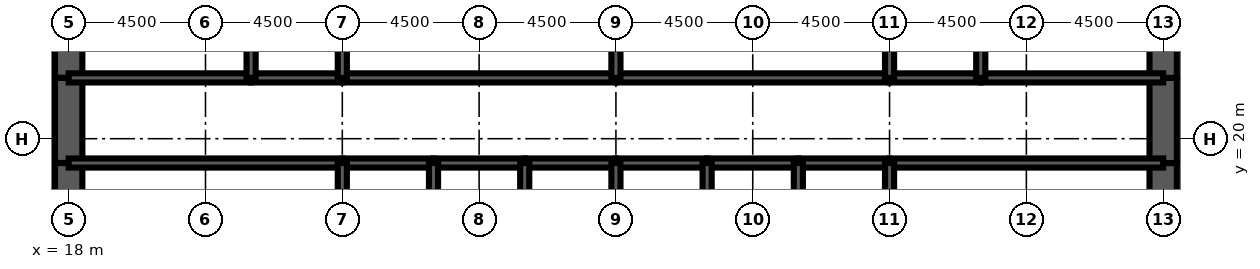
"""IFC4 building model, lengths in metres.
Left out: names, types, materials, properties, quantities, classifications, styles, units other than length and angle.
Written with IfcOpenShell. Run it as: python <this file> out.ifc"""

import sys

from ifc_helpers import new_model, si_unit, direction, frame, frame_2d, origin, place, context, subcontext, project, spatial, rectangle, extrude, element, fill, save


model = new_model("IFC4")
c1 = context("Model", 3, precision=1e-05, world=origin(), true_north=direction((0.0, 1.0)))
c2 = subcontext(c1, "Body", "Model", "MODEL_VIEW")
j1 = project(units=[si_unit("LENGTHUNIT", "METRE"), si_unit("PLANEANGLEUNIT", "RADIAN")], contexts=[c1])
p1 = place(None, origin())
s1 = spatial("IfcSite", under=j1, at=p1, CompositionType="ELEMENT")
p2 = place(p1, origin())
s2 = spatial("IfcBuilding", under=s1, at=p2, CompositionType="ELEMENT")
p3 = place(p2, frame((0.0, 0.0, 63.5)))
s3 = spatial("IfcBuildingStorey", under=s2, at=p3, CompositionType="ELEMENT", Elevation=63.5)
p4 = place(p3, frame((18.0, 26.0, 0.0), z_axis=(0.0, 0.0, 1.0), x_axis=(0.0, -1.0, 0.0)))
e1 = element("IfcWall", 1, at=p4, inside=s3, PredefinedType="SHEAR", context=c2, shape_type="SweptSolid", body=[
    extrude(rectangle(XDim=4.0, YDim=0.9, at=frame_2d((2.0, 0.0))), origin(), (0.0, 0.0, 1.0), 4.5),
])
p5 = place(p3, frame((18.0, 22.0, 0.0), z_axis=(0.0, 0.0, 1.0), x_axis=(0.0, -1.0, 0.0)))
e2 = element("IfcWall", 2, at=p5, inside=s3, PredefinedType="SHEAR", context=c2, shape_type="SweptSolid", body=[
    extrude(rectangle(XDim=2.8, YDim=0.9, at=frame_2d((1.4, 0.0))), origin(), (0.0, 0.0, 1.0), 4.5),
])
p6 = place(p5, frame((0.6, 0.0, 0.0)))
e3 = element("IfcOpeningElement", 3, at=p6, cuts=e2, PredefinedType="OPENING", context=c2, shape_type="SweptSolid", body=[
    extrude(rectangle(XDim=1.8, YDim=2.1, at=frame_2d((0.9, 1.05))), frame((0.0, 0.46, 0.0), z_axis=(0.0, -1.0, 0.0), x_axis=(1.0, 0.0, 0.0)), (0.0, 0.0, 1.0), 0.92),
])
for number, where, z_axis, x_axis in (
    (4, (18.0, 19.2, 0.0), (0.0, 0.0, 1.0), (0.0, -1.0, 0.0)),
    (5, (54.0, 16.0, 0.0), (0.0, 0.0, 1.0), (0.0, 1.0, 0.0)),
):
    element("IfcWall", number, at=place(p3, frame(where, z_axis=z_axis, x_axis=x_axis)), inside=s3, PredefinedType="SHEAR", context=c2, shape_type="SweptSolid", body=[
        extrude(rectangle(XDim=3.2, YDim=0.9, at=frame_2d((1.6, 0.0))), origin(), (0.0, 0.0, 1.0), 4.5),
    ])
p7 = place(p3, frame((54.0, 19.2, 0.0), z_axis=(0.0, 0.0, 1.0), x_axis=(0.0, 1.0, 0.0)))
e6 = element("IfcWall", 6, at=p7, inside=s3, PredefinedType="SHEAR", context=c2, shape_type="SweptSolid", body=[
    extrude(rectangle(XDim=2.8, YDim=0.9, at=frame_2d((1.4, 0.0))), origin(), (0.0, 0.0, 1.0), 4.5),
])
p8 = place(p7, frame((0.4, 0.0, 0.0)))
e7 = element("IfcOpeningElement", 7, at=p8, cuts=e6, PredefinedType="OPENING", context=c2, shape_type="SweptSolid", body=[
    extrude(rectangle(XDim=1.8, YDim=2.1, at=frame_2d((0.9, 1.05))), frame((0.0, 0.46, 0.0), z_axis=(0.0, -1.0, 0.0), x_axis=(1.0, 0.0, 0.0)), (0.0, 0.0, 1.0), 0.92),
])
p9 = place(p3, frame((54.0, 22.0, 0.0), z_axis=(0.0, 0.0, 1.0), x_axis=(0.0, 1.0, 0.0)))
e8 = element("IfcWall", 8, at=p9, inside=s3, PredefinedType="SHEAR", context=c2, shape_type="SweptSolid", body=[
    extrude(rectangle(XDim=4.0, YDim=0.9, at=frame_2d((2.0, 0.0))), origin(), (0.0, 0.0, 1.0), 4.5),
])
p10 = place(p3, frame((18.0, 19.2, 0.0), z_axis=(0.0, 0.0, 1.0), x_axis=(1.0, 0.0, 0.0)))
e9 = element("IfcWall", 9, at=p10, inside=s3, PredefinedType="SOLIDWALL", context=c2, shape_type="SweptSolid", body=[
    extrude(rectangle(XDim=9.0, YDim=0.3, at=frame_2d((4.5, 0.0))), origin(), (0.0, 0.0, 1.0), 4.5),
])
p11 = place(p10, frame((0.65, 0.0, 0.0)))
e10 = element("IfcOpeningElement", 10, at=p11, cuts=e9, PredefinedType="OPENING", context=c2, shape_type="SweptSolid", body=[
    extrude(rectangle(XDim=1.0, YDim=2.1, at=frame_2d((0.5, 1.05))), frame((0.0, 0.16, 0.0), z_axis=(0.0, -1.0, 0.0), x_axis=(1.0, 0.0, 0.0)), (0.0, 0.0, 1.0), 0.32),
])
p12 = place(p3, frame((27.0, 19.2, 0.0), z_axis=(0.0, 0.0, 1.0), x_axis=(1.0, 0.0, 0.0)))
e11 = element("IfcWall", 11, at=p12, inside=s3, PredefinedType="SOLIDWALL", context=c2, shape_type="SweptSolid", body=[
    extrude(rectangle(XDim=3.0, YDim=0.3, at=frame_2d((1.5, 0.0))), origin(), (0.0, 0.0, 1.0), 4.5),
])
p13 = place(p12, frame((0.95, 0.0, 0.0)))
e12 = element("IfcOpeningElement", 12, at=p13, cuts=e11, PredefinedType="OPENING", context=c2, shape_type="SweptSolid", body=[
    extrude(rectangle(XDim=1.1, YDim=2.2, at=frame_2d((0.55, 1.1))), frame((0.0, 0.16, 0.0), z_axis=(0.0, -1.0, 0.0), x_axis=(1.0, 0.0, 0.0)), (0.0, 0.0, 1.0), 0.32),
])
p14 = place(p3, frame((30.0, 19.2, 0.0), z_axis=(0.0, 0.0, 1.0), x_axis=(1.0, 0.0, 0.0)))
e13 = element("IfcWall", 13, at=p14, inside=s3, PredefinedType="SOLIDWALL", context=c2, shape_type="SweptSolid", body=[
    extrude(rectangle(XDim=3.0, YDim=0.3, at=frame_2d((1.5, 0.0))), origin(), (0.0, 0.0, 1.0), 4.5),
])
p15 = place(p14, frame((0.95, 0.0, 0.0)))
e14 = element("IfcOpeningElement", 14, at=p15, cuts=e13, PredefinedType="OPENING", context=c2, shape_type="SweptSolid", body=[
    extrude(rectangle(XDim=1.1, YDim=2.2, at=frame_2d((0.55, 1.1))), frame((0.0, 0.16, 0.0), z_axis=(0.0, -1.0, 0.0), x_axis=(1.0, 0.0, 0.0)), (0.0, 0.0, 1.0), 0.32),
])
p16 = place(p3, frame((33.0, 19.2, 0.0), z_axis=(0.0, 0.0, 1.0), x_axis=(1.0, 0.0, 0.0)))
e15 = element("IfcWall", 15, at=p16, inside=s3, PredefinedType="SOLIDWALL", context=c2, shape_type="SweptSolid", body=[
    extrude(rectangle(XDim=3.0, YDim=0.3, at=frame_2d((1.5, 0.0))), origin(), (0.0, 0.0, 1.0), 4.5),
])
p17 = place(p16, frame((0.95, 0.0, 0.0)))
e16 = element("IfcOpeningElement", 16, at=p17, cuts=e15, PredefinedType="OPENING", context=c2, shape_type="SweptSolid", body=[
    extrude(rectangle(XDim=1.1, YDim=2.2, at=frame_2d((0.55, 1.1))), frame((0.0, 0.16, 0.0), z_axis=(0.0, -1.0, 0.0), x_axis=(1.0, 0.0, 0.0)), (0.0, 0.0, 1.0), 0.32),
])
p18 = place(p3, frame((36.0, 19.2, 0.0), z_axis=(0.0, 0.0, 1.0), x_axis=(1.0, 0.0, 0.0)))
e17 = element("IfcWall", 17, at=p18, inside=s3, PredefinedType="SOLIDWALL", context=c2, shape_type="SweptSolid", body=[
    extrude(rectangle(XDim=3.0, YDim=0.3, at=frame_2d((1.5, 0.0))), origin(), (0.0, 0.0, 1.0), 4.5),
])
p19 = place(p18, frame((0.95, 0.0, 0.0)))
e18 = element("IfcOpeningElement", 18, at=p19, cuts=e17, PredefinedType="OPENING", context=c2, shape_type="SweptSolid", body=[
    extrude(rectangle(XDim=1.1, YDim=2.2, at=frame_2d((0.55, 1.1))), frame((0.0, 0.16, 0.0), z_axis=(0.0, -1.0, 0.0), x_axis=(1.0, 0.0, 0.0)), (0.0, 0.0, 1.0), 0.32),
])
for number, where, z_axis, x_axis in (
    (19, (39.0, 19.2, 0.0), (0.0, 0.0, 1.0), (1.0, 0.0, 0.0)),
    (20, (42.0, 19.2, 0.0), (0.0, 0.0, 1.0), (1.0, 0.0, 0.0)),
):
    element("IfcWall", number, at=place(p3, frame(where, z_axis=z_axis, x_axis=x_axis)), inside=s3, PredefinedType="SOLIDWALL", context=c2, shape_type="SweptSolid", body=[
        extrude(rectangle(XDim=3.0, YDim=0.3, at=frame_2d((1.5, 0.0))), origin(), (0.0, 0.0, 1.0), 4.5),
    ])
p20 = place(p3, frame((45.0, 19.2, 0.0), z_axis=(0.0, 0.0, 1.0), x_axis=(1.0, 0.0, 0.0)))
e21 = element("IfcWall", 21, at=p20, inside=s3, PredefinedType="SOLIDWALL", context=c2, shape_type="SweptSolid", body=[
    extrude(rectangle(XDim=9.0, YDim=0.3, at=frame_2d((4.5, 0.0))), origin(), (0.0, 0.0, 1.0), 4.5),
])
p21 = place(p20, frame((7.35, 0.0, 0.0)))
e22 = element("IfcOpeningElement", 22, at=p21, cuts=e21, PredefinedType="OPENING", context=c2, shape_type="SweptSolid", body=[
    extrude(rectangle(XDim=1.0, YDim=2.1, at=frame_2d((0.5, 1.05))), frame((0.0, 0.16, 0.0), z_axis=(0.0, -1.0, 0.0), x_axis=(1.0, 0.0, 0.0)), (0.0, 0.0, 1.0), 0.32),
])
p22 = place(p3, frame((18.0, 22.0, 0.0), z_axis=(0.0, 0.0, 1.0), x_axis=(1.0, 0.0, 0.0)))
e23 = element("IfcWall", 23, at=p22, inside=s3, PredefinedType="SOLIDWALL", context=c2, shape_type="SweptSolid", body=[
    extrude(rectangle(XDim=6.0, YDim=0.3, at=frame_2d((3.0, 0.0))), origin(), (0.0, 0.0, 1.0), 4.5),
])
p23 = place(p22, frame((2.0, 0.0, 0.0)))
e24 = element("IfcOpeningElement", 24, at=p23, cuts=e23, PredefinedType="OPENING", context=c2, shape_type="SweptSolid", body=[
    extrude(rectangle(XDim=1.0, YDim=2.1, at=frame_2d((0.5, 1.05))), frame((0.0, 0.16, 0.0), z_axis=(0.0, -1.0, 0.0), x_axis=(1.0, 0.0, 0.0)), (0.0, 0.0, 1.0), 0.32),
])
p24 = place(p3, frame((24.0, 22.0, 0.0), z_axis=(0.0, 0.0, 1.0), x_axis=(1.0, 0.0, 0.0)))
e25 = element("IfcWall", 25, at=p24, inside=s3, PredefinedType="SOLIDWALL", context=c2, shape_type="SweptSolid", body=[
    extrude(rectangle(XDim=3.0, YDim=0.3, at=frame_2d((1.5, 0.0))), origin(), (0.0, 0.0, 1.0), 4.5),
])
p25 = place(p24, frame((1.0, 0.0, 0.0)))
e26 = element("IfcOpeningElement", 26, at=p25, cuts=e25, PredefinedType="OPENING", context=c2, shape_type="SweptSolid", body=[
    extrude(rectangle(XDim=1.0, YDim=2.1, at=frame_2d((0.5, 1.05))), frame((0.0, 0.16, 0.0), z_axis=(0.0, -1.0, 0.0), x_axis=(1.0, 0.0, 0.0)), (0.0, 0.0, 1.0), 0.32),
])
p26 = place(p3, frame((27.0, 22.0, 0.0), z_axis=(0.0, 0.0, 1.0), x_axis=(1.0, 0.0, 0.0)))
e27 = element("IfcWall", 27, at=p26, inside=s3, PredefinedType="SOLIDWALL", context=c2, shape_type="SweptSolid", body=[
    extrude(rectangle(XDim=9.0, YDim=0.3, at=frame_2d((4.5, 0.0))), origin(), (0.0, 0.0, 1.0), 4.5),
])
p27 = place(p26, frame((4.0, 0.0, 0.0)))
e28 = element("IfcOpeningElement", 28, at=p27, cuts=e27, PredefinedType="OPENING", context=c2, shape_type="SweptSolid", body=[
    extrude(rectangle(XDim=1.0, YDim=2.1, at=frame_2d((0.5, 1.05))), frame((0.0, 0.16, 0.0), z_axis=(0.0, -1.0, 0.0), x_axis=(1.0, 0.0, 0.0)), (0.0, 0.0, 1.0), 0.32),
])
p28 = place(p3, frame((36.0, 22.0, 0.0), z_axis=(0.0, 0.0, 1.0), x_axis=(1.0, 0.0, 0.0)))
e29 = element("IfcWall", 29, at=p28, inside=s3, PredefinedType="SOLIDWALL", context=c2, shape_type="SweptSolid", body=[
    extrude(rectangle(XDim=9.0, YDim=0.3, at=frame_2d((4.5, 0.0))), origin(), (0.0, 0.0, 1.0), 4.5),
])
p29 = place(p28, frame((4.0, 0.0, 0.0)))
e30 = element("IfcOpeningElement", 30, at=p29, cuts=e29, PredefinedType="OPENING", context=c2, shape_type="SweptSolid", body=[
    extrude(rectangle(XDim=1.0, YDim=2.1, at=frame_2d((0.5, 1.05))), frame((0.0, 0.16, 0.0), z_axis=(0.0, -1.0, 0.0), x_axis=(1.0, 0.0, 0.0)), (0.0, 0.0, 1.0), 0.32),
])
p30 = place(p3, frame((45.0, 22.0, 0.0), z_axis=(0.0, 0.0, 1.0), x_axis=(1.0, 0.0, 0.0)))
e31 = element("IfcWall", 31, at=p30, inside=s3, PredefinedType="SOLIDWALL", context=c2, shape_type="SweptSolid", body=[
    extrude(rectangle(XDim=3.0, YDim=0.3, at=frame_2d((1.5, 0.0))), origin(), (0.0, 0.0, 1.0), 4.5),
])
p31 = place(p30, frame((1.0, 0.0, 0.0)))
e32 = element("IfcOpeningElement", 32, at=p31, cuts=e31, PredefinedType="OPENING", context=c2, shape_type="SweptSolid", body=[
    extrude(rectangle(XDim=1.0, YDim=2.1, at=frame_2d((0.5, 1.05))), frame((0.0, 0.16, 0.0), z_axis=(0.0, -1.0, 0.0), x_axis=(1.0, 0.0, 0.0)), (0.0, 0.0, 1.0), 0.32),
])
p32 = place(p3, frame((48.0, 22.0, 0.0), z_axis=(0.0, 0.0, 1.0), x_axis=(1.0, 0.0, 0.0)))
e33 = element("IfcWall", 33, at=p32, inside=s3, PredefinedType="SOLIDWALL", context=c2, shape_type="SweptSolid", body=[
    extrude(rectangle(XDim=6.0, YDim=0.3, at=frame_2d((3.0, 0.0))), origin(), (0.0, 0.0, 1.0), 4.5),
])
p33 = place(p32, frame((2.0, 0.0, 0.0)))
e34 = element("IfcOpeningElement", 34, at=p33, cuts=e33, PredefinedType="OPENING", context=c2, shape_type="SweptSolid", body=[
    extrude(rectangle(XDim=1.0, YDim=2.1, at=frame_2d((0.5, 1.05))), frame((0.0, 0.16, 0.0), z_axis=(0.0, -1.0, 0.0), x_axis=(1.0, 0.0, 0.0)), (0.0, 0.0, 1.0), 0.32),
])
p34 = place(p32, frame((4.0, 0.0, 0.0)))
e35 = element("IfcOpeningElement", 35, at=p34, cuts=e33, PredefinedType="OPENING", context=c2, shape_type="SweptSolid", body=[
    extrude(rectangle(XDim=1.0, YDim=2.1, at=frame_2d((0.5, 1.05))), frame((0.0, 0.16, 0.0), z_axis=(0.0, -1.0, 0.0), x_axis=(1.0, 0.0, 0.0)), (0.0, 0.0, 1.0), 0.32),
])
for number, where, z_axis, x_axis in (
    (36, (27.0, 16.0, 0.0), (0.0, 0.0, 1.0), (0.0, 1.0, 0.0)),
    (37, (30.0, 16.0, 0.0), (0.0, 0.0, 1.0), (0.0, 1.0, 0.0)),
    (38, (33.0, 16.0, 0.0), (0.0, 0.0, 1.0), (0.0, 1.0, 0.0)),
    (39, (36.0, 16.0, 0.0), (0.0, 0.0, 1.0), (0.0, 1.0, 0.0)),
    (40, (39.0, 16.0, 0.0), (0.0, 0.0, 1.0), (0.0, 1.0, 0.0)),
    (41, (42.0, 16.0, 0.0), (0.0, 0.0, 1.0), (0.0, 1.0, 0.0)),
    (42, (45.0, 16.0, 0.0), (0.0, 0.0, 1.0), (0.0, 1.0, 0.0)),
):
    element("IfcWall", number, at=place(p3, frame(where, z_axis=z_axis, x_axis=x_axis)), inside=s3, PredefinedType="SOLIDWALL", context=c2, shape_type="SweptSolid", body=[
        extrude(rectangle(XDim=3.2, YDim=0.3, at=frame_2d((1.6, 0.0))), origin(), (0.0, 0.0, 1.0), 4.5),
    ])
for number, where, z_axis, x_axis in (
    (43, (24.0, 22.0, 0.0), (0.0, 0.0, 1.0), (0.0, 1.0, 0.0)),
    (44, (27.0, 22.0, 0.0), (0.0, 0.0, 1.0), (0.0, 1.0, 0.0)),
    (45, (36.0, 22.0, 0.0), (0.0, 0.0, 1.0), (0.0, 1.0, 0.0)),
    (46, (45.0, 22.0, 0.0), (0.0, 0.0, 1.0), (0.0, 1.0, 0.0)),
    (47, (48.0, 22.0, 0.0), (0.0, 0.0, 1.0), (0.0, 1.0, 0.0)),
):
    element("IfcWall", number, at=place(p3, frame(where, z_axis=z_axis, x_axis=x_axis)), inside=s3, PredefinedType="SOLIDWALL", context=c2, shape_type="SweptSolid", body=[
        extrude(rectangle(XDim=4.0, YDim=0.3, at=frame_2d((2.0, 0.0))), origin(), (0.0, 0.0, 1.0), 4.5),
    ])
p35 = place(p3, frame((38.5, 22.15, 0.0), z_axis=(0.0, 0.0, 1.0), x_axis=(0.0, 1.0, 0.0)))
e48 = element("IfcWall", 48, at=p35, inside=s3, PredefinedType="PARTITIONING", context=c2, shape_type="SweptSolid", body=[
    extrude(rectangle(XDim=3.7, YDim=0.15, at=frame_2d((1.85, 0.0))), origin(), (0.0, 0.0, 1.0), 3.0),
])
p36 = place(p35, frame((2.2, 0.0, 0.0)))
e49 = element("IfcOpeningElement", 49, at=p36, cuts=e48, PredefinedType="OPENING", context=c2, shape_type="SweptSolid", body=[
    extrude(rectangle(XDim=1.0, YDim=2.1, at=frame_2d((0.5, 1.05))), frame((0.0, 0.085, 0.0), z_axis=(0.0, -1.0, 0.0), x_axis=(1.0, 0.0, 0.0)), (0.0, 0.0, 1.0), 0.17),
])
p37 = place(p3, frame((51.375, 22.15, 0.0), z_axis=(0.0, 0.0, 1.0), x_axis=(0.0, 1.0, 0.0)))
e50 = element("IfcWall", 50, at=p37, inside=s3, PredefinedType="PARTITIONING", context=c2, shape_type="SweptSolid", body=[
    extrude(rectangle(XDim=3.7, YDim=0.15, at=frame_2d((1.85, 0.0))), origin(), (0.0, 0.0, 1.0), 3.0),
])
p38 = place(p13, origin())
e51 = element("IfcDoor", 51, at=p38, inside=s3, OperationType="DOUBLE_DOOR_SLIDING", PredefinedType="USERDEFINED", context=c2, shape_type="SweptSolid", body=[
    extrude(rectangle(XDim=1.1, YDim=2.2, at=frame_2d((0.55, 1.1))), frame((0.0, 0.025, 0.0), z_axis=(0.0, -1.0, 0.0), x_axis=(1.0, 0.0, 0.0)), (0.0, 0.0, 1.0), 0.05),
])
fill(e12, e51)
p39 = place(p15, origin())
e52 = element("IfcDoor", 52, at=p39, inside=s3, OperationType="DOUBLE_DOOR_SLIDING", PredefinedType="USERDEFINED", context=c2, shape_type="SweptSolid", body=[
    extrude(rectangle(XDim=1.1, YDim=2.2, at=frame_2d((0.55, 1.1))), frame((0.0, 0.025, 0.0), z_axis=(0.0, -1.0, 0.0), x_axis=(1.0, 0.0, 0.0)), (0.0, 0.0, 1.0), 0.05),
])
fill(e14, e52)
p40 = place(p17, origin())
e53 = element("IfcDoor", 53, at=p40, inside=s3, OperationType="DOUBLE_DOOR_SLIDING", PredefinedType="USERDEFINED", context=c2, shape_type="SweptSolid", body=[
    extrude(rectangle(XDim=1.1, YDim=2.2, at=frame_2d((0.55, 1.1))), frame((0.0, 0.025, 0.0), z_axis=(0.0, -1.0, 0.0), x_axis=(1.0, 0.0, 0.0)), (0.0, 0.0, 1.0), 0.05),
])
fill(e16, e53)
p41 = place(p19, origin())
e54 = element("IfcDoor", 54, at=p41, inside=s3, OperationType="DOUBLE_DOOR_SLIDING", PredefinedType="USERDEFINED", context=c2, shape_type="SweptSolid", body=[
    extrude(rectangle(XDim=1.1, YDim=2.2, at=frame_2d((0.55, 1.1))), frame((0.0, 0.025, 0.0), z_axis=(0.0, -1.0, 0.0), x_axis=(1.0, 0.0, 0.0)), (0.0, 0.0, 1.0), 0.05),
])
fill(e18, e54)
p42 = place(p11, origin())
e55 = element("IfcDoor", 55, at=p42, inside=s3, OperationType="SINGLE_SWING_LEFT", PredefinedType="DOOR", context=c2, shape_type="SweptSolid", body=[
    extrude(rectangle(XDim=1.0, YDim=2.1, at=frame_2d((0.5, 1.05))), frame((0.0, 0.025, 0.0), z_axis=(0.0, -1.0, 0.0), x_axis=(1.0, 0.0, 0.0)), (0.0, 0.0, 1.0), 0.05),
])
fill(e10, e55)
p43 = place(p21, origin())
e56 = element("IfcDoor", 56, at=p43, inside=s3, OperationType="SINGLE_SWING_RIGHT", PredefinedType="DOOR", context=c2, shape_type="SweptSolid", body=[
    extrude(rectangle(XDim=1.0, YDim=2.1, at=frame_2d((0.5, 1.05))), frame((0.0, 0.025, 0.0), z_axis=(0.0, -1.0, 0.0), x_axis=(1.0, 0.0, 0.0)), (0.0, 0.0, 1.0), 0.05),
])
fill(e22, e56)
p44 = place(p6, origin())
e57 = element("IfcDoor", 57, at=p44, inside=s3, OperationType="SINGLE_SWING_LEFT", PredefinedType="DOOR", context=c2, shape_type="SweptSolid", body=[
    extrude(rectangle(XDim=1.8, YDim=2.1, at=frame_2d((0.9, 1.05))), frame((0.0, 0.45, 0.0), z_axis=(0.0, -1.0, 0.0), x_axis=(1.0, 0.0, 0.0)), (0.0, 0.0, 1.0), 0.899),
])
fill(e3, e57)
p45 = place(p8, origin())
e58 = element("IfcDoor", 58, at=p45, inside=s3, OperationType="SINGLE_SWING_LEFT", PredefinedType="DOOR", context=c2, shape_type="SweptSolid", body=[
    extrude(rectangle(XDim=1.8, YDim=2.1, at=frame_2d((0.9, 1.05))), frame((0.0, 0.45, 0.0), z_axis=(0.0, -1.0, 0.0), x_axis=(1.0, 0.0, 0.0)), (0.0, 0.0, 1.0), 0.899),
])
fill(e7, e58)
p46 = place(p23, origin())
e59 = element("IfcDoor", 59, at=p46, inside=s3, OperationType="SINGLE_SWING_LEFT", PredefinedType="DOOR", context=c2, shape_type="SweptSolid", body=[
    extrude(rectangle(XDim=1.0, YDim=2.1, at=frame_2d((0.5, 1.05))), frame((0.0, 0.025, 0.0), z_axis=(0.0, -1.0, 0.0), x_axis=(1.0, 0.0, 0.0)), (0.0, 0.0, 1.0), 0.05),
])
fill(e24, e59)
p47 = place(p25, origin())
e60 = element("IfcDoor", 60, at=p47, inside=s3, OperationType="SINGLE_SWING_LEFT", PredefinedType="DOOR", context=c2, shape_type="SweptSolid", body=[
    extrude(rectangle(XDim=1.0, YDim=2.1, at=frame_2d((0.5, 1.05))), frame((0.0, 0.025, 0.0), z_axis=(0.0, -1.0, 0.0), x_axis=(1.0, 0.0, 0.0)), (0.0, 0.0, 1.0), 0.05),
])
fill(e26, e60)
p48 = place(p27, origin())
e61 = element("IfcDoor", 61, at=p48, inside=s3, OperationType="SINGLE_SWING_LEFT", PredefinedType="DOOR", context=c2, shape_type="SweptSolid", body=[
    extrude(rectangle(XDim=1.0, YDim=2.1, at=frame_2d((0.5, 1.05))), frame((0.0, 0.025, 0.0), z_axis=(0.0, -1.0, 0.0), x_axis=(1.0, 0.0, 0.0)), (0.0, 0.0, 1.0), 0.05),
])
fill(e28, e61)
p49 = place(p29, origin())
e62 = element("IfcDoor", 62, at=p49, inside=s3, OperationType="SINGLE_SWING_LEFT", PredefinedType="DOOR", context=c2, shape_type="SweptSolid", body=[
    extrude(rectangle(XDim=1.0, YDim=2.1, at=frame_2d((0.5, 1.05))), frame((0.0, 0.025, 0.0), z_axis=(0.0, -1.0, 0.0), x_axis=(1.0, 0.0, 0.0)), (0.0, 0.0, 1.0), 0.05),
])
fill(e30, e62)
p50 = place(p31, origin())
e63 = element("IfcDoor", 63, at=p50, inside=s3, OperationType="SINGLE_SWING_LEFT", PredefinedType="DOOR", context=c2, shape_type="SweptSolid", body=[
    extrude(rectangle(XDim=1.0, YDim=2.1, at=frame_2d((0.5, 1.05))), frame((0.0, 0.025, 0.0), z_axis=(0.0, -1.0, 0.0), x_axis=(1.0, 0.0, 0.0)), (0.0, 0.0, 1.0), 0.05),
])
fill(e32, e63)
p51 = place(p33, origin())
e64 = element("IfcDoor", 64, at=p51, inside=s3, OperationType="SINGLE_SWING_LEFT", PredefinedType="DOOR", context=c2, shape_type="SweptSolid", body=[
    extrude(rectangle(XDim=1.0, YDim=2.1, at=frame_2d((0.5, 1.05))), frame((0.0, 0.025, 0.0), z_axis=(0.0, -1.0, 0.0), x_axis=(1.0, 0.0, 0.0)), (0.0, 0.0, 1.0), 0.05),
])
fill(e34, e64)
p52 = place(p34, origin())
e65 = element("IfcDoor", 65, at=p52, inside=s3, OperationType="SINGLE_SWING_RIGHT", PredefinedType="DOOR", context=c2, shape_type="SweptSolid", body=[
    extrude(rectangle(XDim=1.0, YDim=2.1, at=frame_2d((0.5, 1.05))), frame((0.0, 0.025, 0.0), z_axis=(0.0, -1.0, 0.0), x_axis=(1.0, 0.0, 0.0)), (0.0, 0.0, 1.0), 0.05),
])
fill(e35, e65)
save(model, sys.argv[1])
